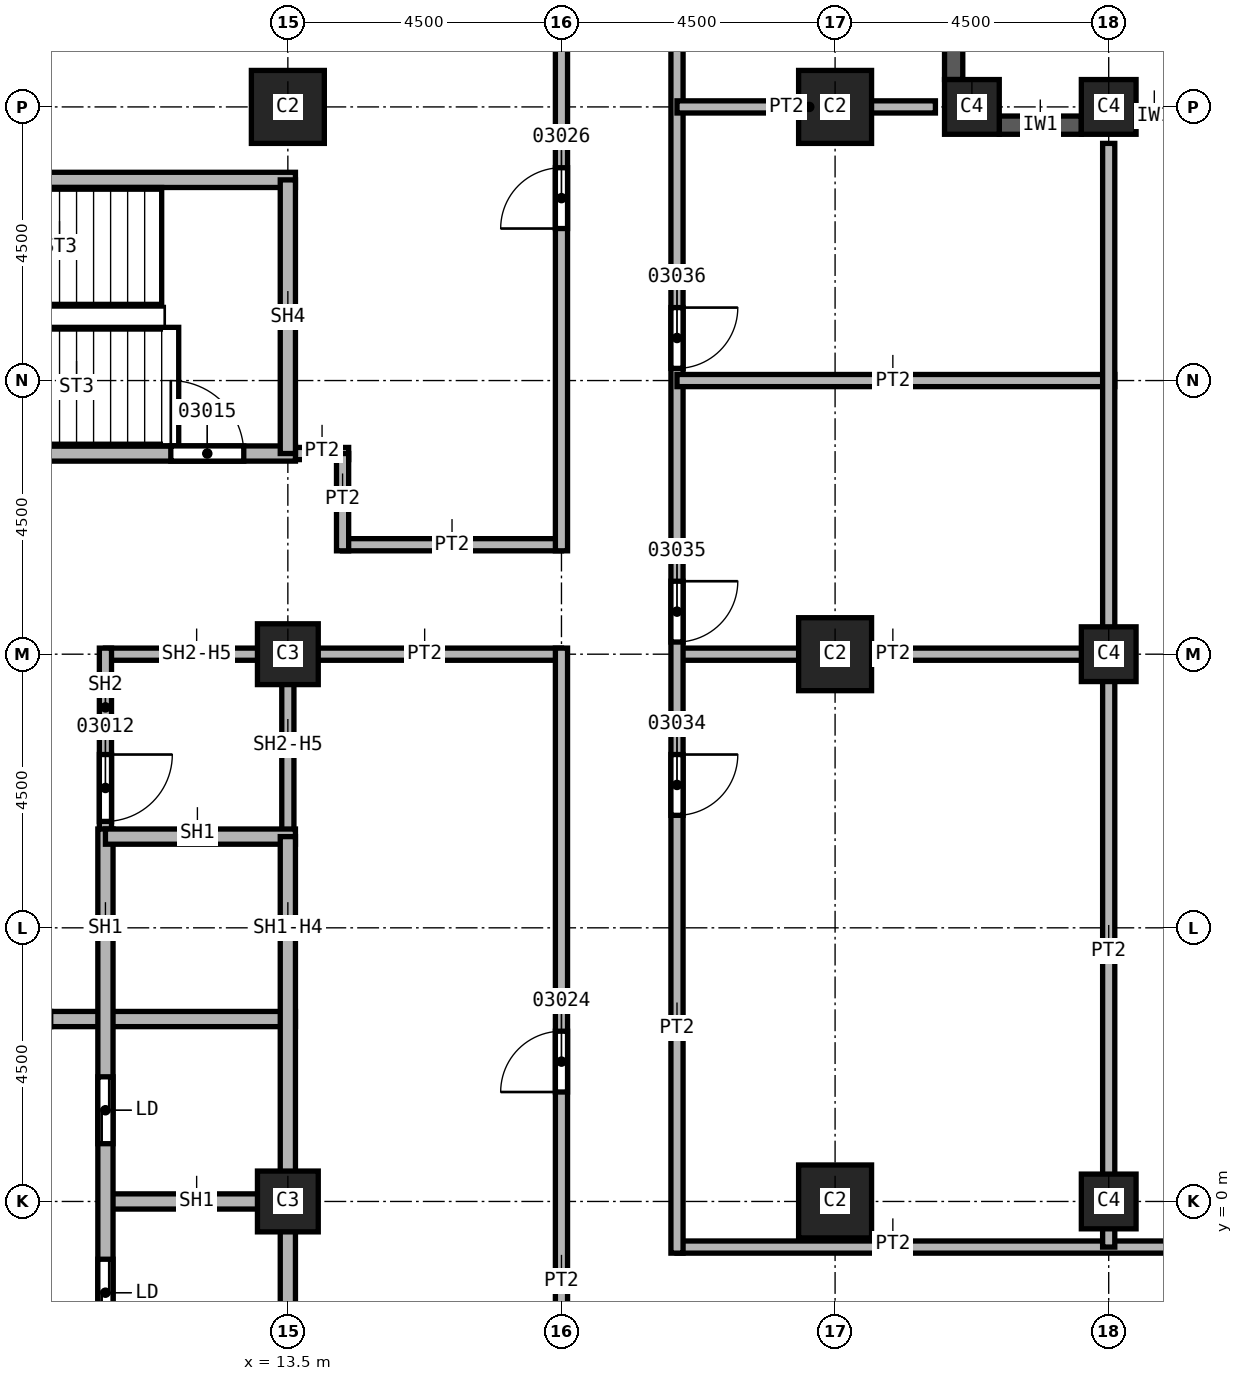
"""IFC4 building model, lengths in metres.
Left out: names, types, materials, properties, quantities, classifications, styles, units other than length and angle.
Written with IfcOpenShell. Run it as: python <this file> out.ifc"""

import sys

from ifc_helpers import new_model, si_unit, direction, frame, frame_2d, origin, origin_2d, place, context, subcontext, project, spatial, rectangle, extrude, element, fill, save


model = new_model("IFC4")
c1 = context("Model", 3, precision=1e-05, world=origin(), true_north=direction((0.0, 1.0)))
c2 = subcontext(c1, "Body", "Model", "MODEL_VIEW")
j1 = project(units=[si_unit("LENGTHUNIT", "METRE"), si_unit("PLANEANGLEUNIT", "RADIAN")], contexts=[c1])
p1 = place(None, origin())
s1 = spatial("IfcSite", under=j1, at=p1, CompositionType="ELEMENT")
p2 = place(p1, origin())
s2 = spatial("IfcBuilding", under=s1, at=p2, CompositionType="ELEMENT")
p3 = place(p2, frame((0.0, 0.0, 92.0)))
s3 = spatial("IfcBuildingStorey", under=s2, at=p3, CompositionType="ELEMENT", Elevation=92.0)
for number, where, z_axis, x_axis in (
    (1, (13.5, 18.0, 0.0), (0.0, 0.0, 1.0), (1.0, 0.0, 0.0)),
    (2, (22.5, 0.0, 0.0), (0.0, 0.0, 1.0), (1.0, 0.0, 0.0)),
    (3, (22.5, 9.0, 0.0), (0.0, 0.0, 1.0), (1.0, 0.0, 0.0)),
    (4, (22.5, 18.0, 0.0), (0.0, 0.0, 1.0), (1.0, 0.0, 0.0)),
):
    element("IfcColumn", number, at=place(p3, frame(where, z_axis=z_axis, x_axis=x_axis)), inside=s3, PredefinedType="COLUMN", context=c2, shape_type="SweptSolid", body=[
        extrude(rectangle(XDim=1.2, YDim=1.2, at=origin_2d()), origin(), (0.0, 0.0, 1.0), 3.7),
    ])
for number, where, z_axis, x_axis in (
    (5, (13.5, 0.0, 0.0), (0.0, 0.0, 1.0), (1.0, 0.0, 0.0)),
    (6, (13.5, 9.0, 0.0), (0.0, 0.0, 1.0), (1.0, 0.0, 0.0)),
):
    element("IfcColumn", number, at=place(p3, frame(where, z_axis=z_axis, x_axis=x_axis)), inside=s3, PredefinedType="COLUMN", context=c2, shape_type="SweptSolid", body=[
        extrude(rectangle(XDim=1.0, YDim=1.0, at=origin_2d()), origin(), (0.0, 0.0, 1.0), 3.7),
    ])
for number, where, z_axis, x_axis in (
    (7, (27.0, 0.0, 0.0), (0.0, 0.0, 1.0), (1.0, 0.0, 0.0)),
    (8, (27.0, 9.0, 0.0), (0.0, 0.0, 1.0), (1.0, 0.0, 0.0)),
    (9, (27.0, 18.0, 0.0), (0.0, 0.0, 1.0), (1.0, 0.0, 0.0)),
    (10, (24.75, 18.0, 0.0), (0.0, 0.0, 1.0), (1.0, 0.0, 0.0)),
):
    element("IfcColumn", number, at=place(p3, frame(where, z_axis=z_axis, x_axis=x_axis)), inside=s3, PredefinedType="COLUMN", context=c2, shape_type="SweptSolid", body=[
        extrude(rectangle(XDim=0.9, YDim=0.9, at=origin_2d()), origin(), (0.0, 0.0, 1.0), 3.7),
    ])
p4 = place(p3, frame((31.05, 17.85, 0.0), z_axis=(0.0, 0.0, 1.0), x_axis=(-1.0, 0.0, 0.0)))
e11 = element("IfcWall", 11, at=p4, inside=s3, PredefinedType="SOLIDWALL", context=c2, shape_type="SweptSolid", body=[
    extrude(rectangle(XDim=3.6, YDim=0.3, at=frame_2d((1.8, 0.0))), origin(), (0.0, 0.0, 1.0), 3.1),
])
p5 = place(p4, frame((0.6, 0.0, 0.8)))
e12 = element("IfcOpeningElement", 12, at=p5, cuts=e11, PredefinedType="OPENING", context=c2, shape_type="SweptSolid", body=[
    extrude(rectangle(XDim=2.4, YDim=1.95, at=frame_2d((1.2, 0.975))), frame((0.0, 0.15, 0.0), z_axis=(0.0, -1.0, 0.0), x_axis=(1.0, 0.0, 0.0)), (0.0, 0.0, 1.0), 0.3),
])
p6 = place(p3, frame((26.55, 17.7, 0.0), z_axis=(0.0, 0.0, 1.0), x_axis=(-1.0, 0.0, 0.0)))
e13 = element("IfcWall", 13, at=p6, inside=s3, PredefinedType="SOLIDWALL", context=c2, shape_type="SweptSolid", body=[
    extrude(rectangle(XDim=1.35, YDim=0.3, at=frame_2d((0.675, 0.0))), origin(), (0.0, 0.0, 1.0), 3.1),
])
p7 = place(p3, frame((24.45, 18.45, 0.0), z_axis=(0.0, 0.0, 1.0), x_axis=(0.0, 1.0, 0.0)))
e14 = element("IfcWall", 14, at=p7, inside=s3, PredefinedType="SOLIDWALL", context=c2, shape_type="SweptSolid", body=[
    extrude(rectangle(XDim=2.5, YDim=0.3, at=frame_2d((1.25, 0.0))), origin(), (0.0, 0.0, 1.0), 3.1),
])
p8 = place(p3, frame((13.375, 12.3, 0.0), z_axis=(0.0, 0.0, 1.0), x_axis=(1.0, 0.0, 0.0)))
e15 = element("IfcWall", 15, at=p8, inside=s3, PredefinedType="PARTITIONING", context=c2, shape_type="SweptSolid", body=[
    extrude(rectangle(XDim=1.125, YDim=0.2, at=frame_2d((0.562, 0.0))), origin(), (0.0, 0.0, 1.0), 3.7),
])
p9 = place(p3, frame((18.0, 9.0, 0.0), z_axis=(0.0, 0.0, 1.0), x_axis=(-1.0, 0.0, 0.0)))
e16 = element("IfcWall", 16, at=p9, inside=s3, PredefinedType="PARTITIONING", context=c2, shape_type="SweptSolid", body=[
    extrude(rectangle(XDim=4.5, YDim=0.2, at=frame_2d((2.25, 0.0))), origin(), (0.0, 0.0, 1.0), 3.7),
])
p10 = place(p3, frame((14.4, 10.8, 0.0), z_axis=(0.0, 0.0, 1.0), x_axis=(1.0, 0.0, 0.0)))
e17 = element("IfcWall", 17, at=p10, inside=s3, PredefinedType="PARTITIONING", context=c2, shape_type="SweptSolid", body=[
    extrude(rectangle(XDim=3.6, YDim=0.2, at=frame_2d((1.8, 0.0))), origin(), (0.0, 0.0, 1.0), 3.7),
])
p11 = place(p3, frame((14.4, 12.3, 0.0), z_axis=(0.0, 0.0, 1.0), x_axis=(0.0, -1.0, 0.0)))
e18 = element("IfcWall", 18, at=p11, inside=s3, PredefinedType="PARTITIONING", context=c2, shape_type="SweptSolid", body=[
    extrude(rectangle(XDim=1.6, YDim=0.2, at=frame_2d((0.8, 0.0))), origin(), (0.0, 0.0, 1.0), 3.7),
])
p12 = place(p3, frame((18.0, -9.1, 0.0), z_axis=(0.0, 0.0, 1.0), x_axis=(0.0, 1.0, 0.0)))
e19 = element("IfcWall", 19, at=p12, inside=s3, PredefinedType="PARTITIONING", context=c2, shape_type="SweptSolid", body=[
    extrude(rectangle(XDim=18.2, YDim=0.2, at=frame_2d((9.1, 0.0))), origin(), (0.0, 0.0, 1.0), 3.7),
])
p13 = place(p12, frame((2.8, 0.0, 0.0)))
e20 = element("IfcOpeningElement", 20, at=p13, cuts=e19, PredefinedType="OPENING", context=c2, shape_type="SweptSolid", body=[
    extrude(rectangle(XDim=1.0, YDim=2.1, at=frame_2d((0.5, 1.05))), frame((0.0, 0.1, 0.0), z_axis=(0.0, -1.0, 0.0), x_axis=(1.0, 0.0, 0.0)), (0.0, 0.0, 1.0), 0.2),
])
p14 = place(p12, frame((10.9, 0.0, 0.0)))
e21 = element("IfcOpeningElement", 21, at=p14, cuts=e19, PredefinedType="OPENING", context=c2, shape_type="SweptSolid", body=[
    extrude(rectangle(XDim=1.0, YDim=2.1, at=frame_2d((0.5, 1.05))), frame((0.0, 0.1, 0.0), z_axis=(0.0, -1.0, 0.0), x_axis=(1.0, 0.0, 0.0)), (0.0, 0.0, 1.0), 0.2),
])
p15 = place(p3, frame((18.0, 10.7, 0.0), z_axis=(0.0, 0.0, 1.0), x_axis=(0.0, 1.0, 0.0)))
e22 = element("IfcWall", 22, at=p15, inside=s3, PredefinedType="PARTITIONING", context=c2, shape_type="SweptSolid", body=[
    extrude(rectangle(XDim=13.5, YDim=0.2, at=frame_2d((6.75, 0.0))), origin(), (0.0, 0.0, 1.0), 3.7),
])
p16 = place(p15, frame((5.3, 0.0, 0.0)))
e23 = element("IfcOpeningElement", 23, at=p16, cuts=e22, PredefinedType="OPENING", context=c2, shape_type="SweptSolid", body=[
    extrude(rectangle(XDim=1.0, YDim=2.1, at=frame_2d((0.5, 1.05))), frame((0.0, 0.1, 0.0), z_axis=(0.0, -1.0, 0.0), x_axis=(1.0, 0.0, 0.0)), (0.0, 0.0, 1.0), 0.2),
])
p17 = place(p3, frame((19.9, -0.75, 0.0), z_axis=(0.0, 0.0, 1.0), x_axis=(1.0, 0.0, 0.0)))
e24 = element("IfcWall", 24, at=p17, inside=s3, PredefinedType="PARTITIONING", context=c2, shape_type="SweptSolid", body=[
    extrude(rectangle(XDim=13.95, YDim=0.2, at=frame_2d((6.975, 0.0))), origin(), (0.0, 0.0, 1.0), 3.7),
])
p18 = place(p3, frame((19.9, 9.0, 0.0), z_axis=(0.0, 0.0, 1.0), x_axis=(1.0, 0.0, 0.0)))
e25 = element("IfcWall", 25, at=p18, inside=s3, PredefinedType="PARTITIONING", context=c2, shape_type="SweptSolid", body=[
    extrude(rectangle(XDim=7.2, YDim=0.2, at=frame_2d((3.6, 0.0))), origin(), (0.0, 0.0, 1.0), 3.7),
])
p19 = place(p3, frame((19.9, 24.5, 0.0), z_axis=(0.0, 0.0, 1.0), x_axis=(0.0, -1.0, 0.0)))
e26 = element("IfcWall", 26, at=p19, inside=s3, PredefinedType="PARTITIONING", context=c2, shape_type="SweptSolid", body=[
    extrude(rectangle(XDim=25.35, YDim=0.2, at=frame_2d((12.675, 0.0))), origin(), (0.0, 0.0, 1.0), 3.7),
])
p20 = place(p19, frame((17.15, 0.0, 0.0)))
e27 = element("IfcOpeningElement", 27, at=p20, cuts=e26, PredefinedType="OPENING", context=c2, shape_type="SweptSolid", body=[
    extrude(rectangle(XDim=1.0, YDim=2.1, at=frame_2d((0.5, 1.05))), frame((0.0, 0.1, 0.0), z_axis=(0.0, -1.0, 0.0), x_axis=(1.0, 0.0, 0.0)), (0.0, 0.0, 1.0), 0.2),
])
p21 = place(p19, frame((14.3, 0.0, 0.0)))
e28 = element("IfcOpeningElement", 28, at=p21, cuts=e26, PredefinedType="OPENING", context=c2, shape_type="SweptSolid", body=[
    extrude(rectangle(XDim=1.0, YDim=2.1, at=frame_2d((0.5, 1.05))), frame((0.0, 0.1, 0.0), z_axis=(0.0, -1.0, 0.0), x_axis=(1.0, 0.0, 0.0)), (0.0, 0.0, 1.0), 0.2),
])
p22 = place(p19, frame((9.8, 0.0, 0.0)))
e29 = element("IfcOpeningElement", 29, at=p22, cuts=e26, PredefinedType="OPENING", context=c2, shape_type="SweptSolid", body=[
    extrude(rectangle(XDim=1.0, YDim=2.1, at=frame_2d((0.5, 1.05))), frame((0.0, 0.1, 0.0), z_axis=(0.0, -1.0, 0.0), x_axis=(1.0, 0.0, 0.0)), (0.0, 0.0, 1.0), 0.2),
])
p23 = place(p19, frame((3.7, 0.0, 0.0)))
e30 = element("IfcOpeningElement", 30, at=p23, cuts=e26, PredefinedType="OPENING", context=c2, shape_type="SweptSolid", body=[
    extrude(rectangle(XDim=1.0, YDim=2.1, at=frame_2d((0.5, 1.05))), frame((0.0, 0.1, 0.0), z_axis=(0.0, -1.0, 0.0), x_axis=(1.0, 0.0, 0.0)), (0.0, 0.0, 1.0), 0.2),
])
p24 = place(p3, frame((19.9, 13.5, 0.0), z_axis=(0.0, 0.0, 1.0), x_axis=(1.0, 0.0, 0.0)))
e31 = element("IfcWall", 31, at=p24, inside=s3, PredefinedType="PARTITIONING", context=c2, shape_type="SweptSolid", body=[
    extrude(rectangle(XDim=7.2, YDim=0.2, at=frame_2d((3.6, 0.0))), origin(), (0.0, 0.0, 1.0), 3.7),
])
p25 = place(p3, frame((19.9, 18.0, 0.0), z_axis=(0.0, 0.0, 1.0), x_axis=(1.0, 0.0, 0.0)))
e32 = element("IfcWall", 32, at=p25, inside=s3, PredefinedType="PARTITIONING", context=c2, shape_type="SweptSolid", body=[
    extrude(rectangle(XDim=4.25, YDim=0.2, at=frame_2d((2.125, 0.0))), origin(), (0.0, 0.0, 1.0), 3.7),
])
p26 = place(p3, frame((27.0, 17.4, 0.0), z_axis=(0.0, 0.0, 1.0), x_axis=(0.0, -1.0, 0.0)))
e33 = element("IfcWall", 33, at=p26, inside=s3, PredefinedType="PARTITIONING", context=c2, shape_type="SweptSolid", body=[
    extrude(rectangle(XDim=18.15, YDim=0.2, at=frame_2d((9.075, 0.0))), origin(), (0.0, 0.0, 1.0), 3.7),
])
p27 = place(p3, frame((10.5, 9.0, 0.0), z_axis=(0.0, 0.0, 1.0), x_axis=(1.0, 0.0, 0.0)))
e34 = element("IfcWall", 34, at=p27, inside=s3, PredefinedType="SOLIDWALL", context=c2, shape_type="SweptSolid", body=[
    extrude(rectangle(XDim=3.1, YDim=0.2, at=frame_2d((1.55, 0.0))), origin(), (0.0, 0.0, 1.0), 2.938),
])
p28 = place(p3, frame((10.5, 9.1, 0.0), z_axis=(0.0, 0.0, 1.0), x_axis=(0.0, -1.0, 0.0)))
e35 = element("IfcWall", 35, at=p28, inside=s3, PredefinedType="SOLIDWALL", context=c2, shape_type="SweptSolid", body=[
    extrude(rectangle(XDim=3.225, YDim=0.2, at=frame_2d((1.613, 0.0))), origin(), (0.0, 0.0, 1.0), 3.7),
])
p29 = place(p28, frame((1.75, 0.0, 0.0)))
e36 = element("IfcOpeningElement", 36, at=p29, cuts=e35, PredefinedType="OPENING", context=c2, shape_type="SweptSolid", body=[
    extrude(rectangle(XDim=1.1, YDim=2.1, at=frame_2d((0.55, 1.05))), frame((0.0, 0.1, 0.0), z_axis=(0.0, -1.0, 0.0), x_axis=(1.0, 0.0, 0.0)), (0.0, 0.0, 1.0), 0.2),
])
p30 = place(p3, frame((13.5, 9.1, 0.0), z_axis=(0.0, 0.0, 1.0), x_axis=(0.0, -1.0, 0.0)))
e37 = element("IfcWall", 37, at=p30, inside=s3, PredefinedType="SOLIDWALL", context=c2, shape_type="SweptSolid", body=[
    extrude(rectangle(XDim=3.1, YDim=0.2, at=frame_2d((1.55, 0.0))), origin(), (0.0, 0.0, 1.0), 2.938),
])
p31 = place(p3, frame((4.375, 3.0, 0.0), z_axis=(0.0, 0.0, 1.0), x_axis=(1.0, 0.0, 0.0)))
e38 = element("IfcWall", 38, at=p31, inside=s3, PredefinedType="SOLIDWALL", context=c2, shape_type="SweptSolid", body=[
    extrude(rectangle(XDim=9.25, YDim=0.25, at=frame_2d((4.625, 0.0))), origin(), (0.0, 0.0, 1.0), 3.7),
])
p32 = place(p31, frame((4.125, 0.0, 0.0)))
e39 = element("IfcOpeningElement", 39, at=p32, cuts=e38, PredefinedType="OPENING", context=c2, shape_type="SweptSolid", body=[
    extrude(rectangle(XDim=1.1, YDim=2.1, at=frame_2d((0.55, 1.05))), frame((0.0, 0.125, 0.0), z_axis=(0.0, -1.0, 0.0), x_axis=(1.0, 0.0, 0.0)), (0.0, 0.0, 1.0), 0.25),
])
p33 = place(p3, frame((10.5, 0.0, 0.0), z_axis=(0.0, 0.0, 1.0), x_axis=(1.0, 0.0, 0.0)))
e40 = element("IfcWall", 40, at=p33, inside=s3, PredefinedType="SOLIDWALL", context=c2, shape_type="SweptSolid", body=[
    extrude(rectangle(XDim=3.125, YDim=0.25, at=frame_2d((1.562, 0.0))), origin(), (0.0, 0.0, 1.0), 3.7),
])
p34 = place(p3, frame((10.5, 6.125, 0.0), z_axis=(0.0, 0.0, 1.0), x_axis=(0.0, -1.0, 0.0)))
e41 = element("IfcWall", 41, at=p34, inside=s3, PredefinedType="SOLIDWALL", context=c2, shape_type="SweptSolid", body=[
    extrude(rectangle(XDim=9.25, YDim=0.25, at=frame_2d((4.625, 0.0))), origin(), (0.0, 0.0, 1.0), 3.7),
])
p35 = place(p34, frame((7.075, 0.0, 0.0)))
e42 = element("IfcOpeningElement", 42, at=p35, cuts=e41, PredefinedType="OPENING", context=c2, shape_type="SweptSolid", body=[
    extrude(rectangle(XDim=1.1, YDim=2.1, at=frame_2d((0.55, 1.05))), frame((0.0, 0.125, 0.0), z_axis=(0.0, -1.0, 0.0), x_axis=(1.0, 0.0, 0.0)), (0.0, 0.0, 1.0), 0.25),
])
p36 = place(p34, frame((4.075, 0.0, 0.0)))
e43 = element("IfcOpeningElement", 43, at=p36, cuts=e41, PredefinedType="OPENING", context=c2, shape_type="SweptSolid", body=[
    extrude(rectangle(XDim=1.1, YDim=2.1, at=frame_2d((0.55, 1.05))), frame((0.0, 0.125, 0.0), z_axis=(0.0, -1.0, 0.0), x_axis=(1.0, 0.0, 0.0)), (0.0, 0.0, 1.0), 0.25),
])
p37 = place(p3, frame((10.5, 6.0, 0.0), z_axis=(0.0, 0.0, 1.0), x_axis=(1.0, 0.0, 0.0)))
e44 = element("IfcWall", 44, at=p37, inside=s3, PredefinedType="SOLIDWALL", context=c2, shape_type="SweptSolid", body=[
    extrude(rectangle(XDim=3.125, YDim=0.25, at=frame_2d((1.562, 0.0))), origin(), (0.0, 0.0, 1.0), 3.7),
])
p38 = place(p3, frame((13.5, 6.0, 0.0), z_axis=(0.0, 0.0, 1.0), x_axis=(0.0, -1.0, 0.0)))
e45 = element("IfcWall", 45, at=p38, inside=s3, PredefinedType="SOLIDWALL", context=c2, shape_type="SweptSolid", body=[
    extrude(rectangle(XDim=9.0, YDim=0.25, at=frame_2d((4.5, 0.0))), origin(), (0.0, 0.0, 1.0), 2.938),
])
p39 = place(p3, frame((4.375, 12.3, 0.0), z_axis=(0.0, 0.0, 1.0), x_axis=(1.0, 0.0, 0.0)))
e46 = element("IfcWall", 46, at=p39, inside=s3, PredefinedType="SOLIDWALL", context=c2, shape_type="SweptSolid", body=[
    extrude(rectangle(XDim=9.25, YDim=0.25, at=frame_2d((4.625, 0.0))), origin(), (0.0, 0.0, 1.0), 3.7),
])
p40 = place(p39, frame((7.2, 0.0, 0.0)))
e47 = element("IfcOpeningElement", 47, at=p40, cuts=e46, PredefinedType="OPENING", context=c2, shape_type="SweptSolid", body=[
    extrude(rectangle(XDim=1.2, YDim=2.1, at=frame_2d((0.6, 1.05))), frame((0.0, 0.125, 0.0), z_axis=(0.0, -1.0, 0.0), x_axis=(1.0, 0.0, 0.0)), (0.0, 0.0, 1.0), 0.25),
])
p41 = place(p3, frame((4.375, 16.8, 0.0), z_axis=(0.0, 0.0, 1.0), x_axis=(1.0, 0.0, 0.0)))
e48 = element("IfcWall", 48, at=p41, inside=s3, PredefinedType="SOLIDWALL", context=c2, shape_type="SweptSolid", body=[
    extrude(rectangle(XDim=9.25, YDim=0.25, at=frame_2d((4.625, 0.0))), origin(), (0.0, 0.0, 1.0), 3.7),
])
p42 = place(p3, frame((13.5, 16.8, 0.0), z_axis=(0.0, 0.0, 1.0), x_axis=(0.0, -1.0, 0.0)))
e49 = element("IfcWall", 49, at=p42, inside=s3, PredefinedType="SOLIDWALL", context=c2, shape_type="SweptSolid", body=[
    extrude(rectangle(XDim=4.5, YDim=0.25, at=frame_2d((2.25, 0.0))), origin(), (0.0, 0.0, 1.0), 3.7),
])
p43 = place(p29, origin())
e50 = element("IfcDoor", 50, at=p43, inside=s3, OperationType="SINGLE_SWING_LEFT", PredefinedType="DOOR", context=c2, shape_type="SweptSolid", body=[
    extrude(rectangle(XDim=1.1, YDim=2.1, at=frame_2d((0.55, 1.05))), frame((0.0, 0.025, 0.0), z_axis=(0.0, -1.0, 0.0), x_axis=(1.0, 0.0, 0.0)), (0.0, 0.0, 1.0), 0.05),
])
fill(e36, e50)
p44 = place(p40, origin())
e51 = element("IfcDoor", 51, at=p44, inside=s3, OperationType="SINGLE_SWING_RIGHT", PredefinedType="DOOR", context=c2, shape_type="SweptSolid", body=[
    extrude(rectangle(XDim=1.2, YDim=2.1, at=frame_2d((0.6, 1.05))), frame((0.0, 0.025, 0.0), z_axis=(0.0, -1.0, 0.0), x_axis=(1.0, 0.0, 0.0)), (0.0, 0.0, 1.0), 0.05),
])
fill(e47, e51)
p45 = place(p14, origin())
e52 = element("IfcDoor", 52, at=p45, inside=s3, OperationType="SINGLE_SWING_LEFT", PredefinedType="DOOR", context=c2, shape_type="SweptSolid", body=[
    extrude(rectangle(XDim=1.0, YDim=2.1, at=frame_2d((0.5, 1.05))), frame((0.0, 0.025, 0.0), z_axis=(0.0, -1.0, 0.0), x_axis=(1.0, 0.0, 0.0)), (0.0, 0.0, 1.0), 0.05),
])
fill(e21, e52)
p46 = place(p16, origin())
e53 = element("IfcDoor", 53, at=p46, inside=s3, OperationType="SINGLE_SWING_LEFT", PredefinedType="DOOR", context=c2, shape_type="SweptSolid", body=[
    extrude(rectangle(XDim=1.0, YDim=2.1, at=frame_2d((0.5, 1.05))), frame((0.0, 0.025, 0.0), z_axis=(0.0, -1.0, 0.0), x_axis=(1.0, 0.0, 0.0)), (0.0, 0.0, 1.0), 0.05),
])
fill(e23, e53)
p47 = place(p20, origin())
e54 = element("IfcDoor", 54, at=p47, inside=s3, OperationType="SINGLE_SWING_LEFT", PredefinedType="DOOR", context=c2, shape_type="SweptSolid", body=[
    extrude(rectangle(XDim=1.0, YDim=2.1, at=frame_2d((0.5, 1.05))), frame((0.0, 0.025, 0.0), z_axis=(0.0, -1.0, 0.0), x_axis=(1.0, 0.0, 0.0)), (0.0, 0.0, 1.0), 0.05),
])
fill(e27, e54)
p48 = place(p21, origin())
e55 = element("IfcDoor", 55, at=p48, inside=s3, OperationType="SINGLE_SWING_RIGHT", PredefinedType="DOOR", context=c2, shape_type="SweptSolid", body=[
    extrude(rectangle(XDim=1.0, YDim=2.1, at=frame_2d((0.5, 1.05))), frame((0.0, 0.025, 0.0), z_axis=(0.0, -1.0, 0.0), x_axis=(1.0, 0.0, 0.0)), (0.0, 0.0, 1.0), 0.05),
])
fill(e28, e55)
p49 = place(p22, origin())
e56 = element("IfcDoor", 56, at=p49, inside=s3, OperationType="SINGLE_SWING_LEFT", PredefinedType="DOOR", context=c2, shape_type="SweptSolid", body=[
    extrude(rectangle(XDim=1.0, YDim=2.1, at=frame_2d((0.5, 1.05))), frame((0.0, 0.025, 0.0), z_axis=(0.0, -1.0, 0.0), x_axis=(1.0, 0.0, 0.0)), (0.0, 0.0, 1.0), 0.05),
])
fill(e29, e56)
p50 = place(p35, origin())
e57 = element("IfcDoor", 57, at=p50, inside=s3, OperationType="SLIDING_TO_LEFT", PredefinedType="DOOR", context=c2, shape_type="SweptSolid", body=[
    extrude(rectangle(XDim=1.1, YDim=2.1, at=frame_2d((0.55, 1.05))), frame((0.0, 0.025, 0.0), z_axis=(0.0, -1.0, 0.0), x_axis=(1.0, 0.0, 0.0)), (0.0, 0.0, 1.0), 0.05),
])
fill(e42, e57)
p51 = place(p36, origin())
e58 = element("IfcDoor", 58, at=p51, inside=s3, OperationType="SLIDING_TO_LEFT", PredefinedType="DOOR", context=c2, shape_type="SweptSolid", body=[
    extrude(rectangle(XDim=1.1, YDim=2.1, at=frame_2d((0.55, 1.05))), frame((0.0, 0.025, 0.0), z_axis=(0.0, -1.0, 0.0), x_axis=(1.0, 0.0, 0.0)), (0.0, 0.0, 1.0), 0.05),
])
fill(e43, e58)
save(model, sys.argv[1])
